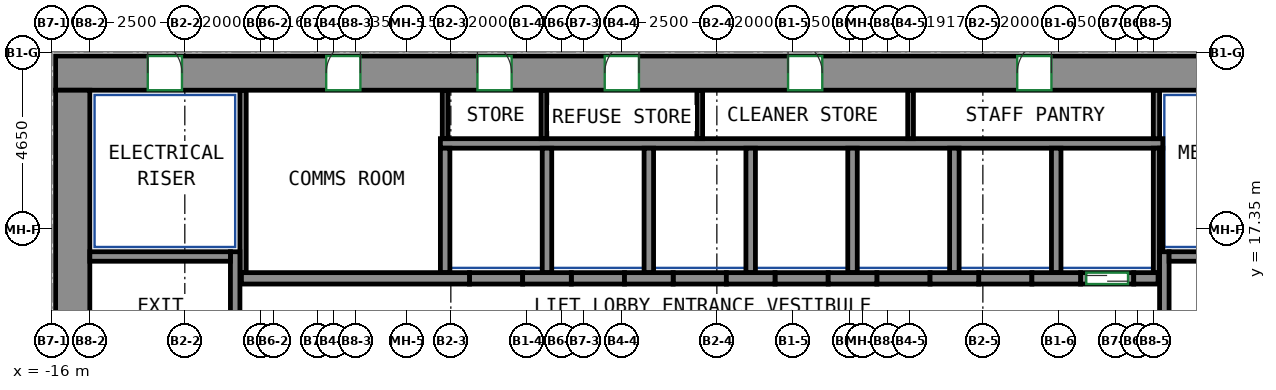
"""IFC4 building model, lengths in metres.
Left out: names, types, materials, properties, quantities, classifications, styles, units other than length and angle.
Written with IfcOpenShell. Run it as: python <this file> out.ifc"""

import sys

from ifc_helpers import new_model, si_unit, direction, frame, frame_2d, origin, place, context, subcontext, project, spatial, rectangle, extrude, source, transform, mapped, element, fill, save


model = new_model("IFC4")
c1 = context("Model", 3, precision=1e-05, world=origin(), true_north=direction((0.0, 1.0)))
c2 = subcontext(c1, "Body", "Model", "MODEL_VIEW")
j1 = project(units=[si_unit("LENGTHUNIT", "METRE"), si_unit("PLANEANGLEUNIT", "RADIAN")], contexts=[c1])
p1 = place(None, origin())
s1 = spatial("IfcSite", under=j1, at=p1, CompositionType="ELEMENT")
p2 = place(p1, origin())
s2 = spatial("IfcBuilding", under=s1, at=p2, CompositionType="ELEMENT")
p3 = place(p2, frame((0.0, 0.0, 116.6)))
s3 = spatial("IfcBuildingStorey", under=s2, at=p3, CompositionType="ELEMENT", Elevation=116.6)
m1 = source(origin(), c2, "Body", "SweptSolid", [
    extrude(rectangle(XDim=33.9, YDim=0.9, at=frame_2d((16.95, 0.0))), origin(), (0.0, 0.0, 1.0), 3.72),
])
p4 = place(p3, frame((-15.9, 21.45, 0.0), z_axis=(0.0, 0.0, 1.0), x_axis=(1.0, 0.0, 0.0)))
e1 = element("IfcWall", 1, at=p4, inside=s3, PredefinedType="SHEAR", context=c2, shape_type="MappedRepresentation", body=[
    mapped(m1, transform((0.0, 0.0, 0.0))),
])
p5 = place(p4, frame((7.12, 0.0, 0.0)))
e2 = element("IfcOpeningElement", 2, at=p5, cuts=e1, PredefinedType="OPENING", context=c2, shape_type="SweptSolid", body=[
    extrude(rectangle(XDim=0.9, YDim=2.1, at=frame_2d((0.45, 1.05))), frame((0.0, 0.46, 0.0), z_axis=(0.0, -1.0, 0.0), x_axis=(1.0, 0.0, 0.0)), (0.0, 0.0, 1.0), 0.92),
])
p6 = place(p4, frame((11.1, 0.0, 0.0)))
e3 = element("IfcOpeningElement", 3, at=p6, cuts=e1, PredefinedType="OPENING", context=c2, shape_type="SweptSolid", body=[
    extrude(rectangle(XDim=0.9, YDim=2.1, at=frame_2d((0.45, 1.05))), frame((0.0, 0.46, 0.0), z_axis=(0.0, -1.0, 0.0), x_axis=(1.0, 0.0, 0.0)), (0.0, 0.0, 1.0), 0.92),
])
p7 = place(p4, frame((14.45, 0.0, 0.0)))
e4 = element("IfcOpeningElement", 4, at=p7, cuts=e1, PredefinedType="OPENING", context=c2, shape_type="SweptSolid", body=[
    extrude(rectangle(XDim=0.9, YDim=2.1, at=frame_2d((0.45, 1.05))), frame((0.0, 0.46, 0.0), z_axis=(0.0, -1.0, 0.0), x_axis=(1.0, 0.0, 0.0)), (0.0, 0.0, 1.0), 0.92),
])
p8 = place(p4, frame((19.274, 0.0, 0.0)))
e5 = element("IfcOpeningElement", 5, at=p8, cuts=e1, PredefinedType="OPENING", context=c2, shape_type="SweptSolid", body=[
    extrude(rectangle(XDim=0.9, YDim=2.1, at=frame_2d((0.45, 1.05))), frame((0.0, 0.46, 0.0), z_axis=(0.0, -1.0, 0.0), x_axis=(1.0, 0.0, 0.0)), (0.0, 0.0, 1.0), 0.92),
])
p9 = place(p4, frame((25.304, 0.0, 0.0)))
e6 = element("IfcOpeningElement", 6, at=p9, cuts=e1, PredefinedType="OPENING", context=c2, shape_type="SweptSolid", body=[
    extrude(rectangle(XDim=0.9, YDim=2.1, at=frame_2d((0.45, 1.05))), frame((0.0, 0.46, 0.0), z_axis=(0.0, -1.0, 0.0), x_axis=(1.0, 0.0, 0.0)), (0.0, 0.0, 1.0), 0.92),
])
p10 = place(p4, frame((2.425, 0.0, 0.0)))
e7 = element("IfcOpeningElement", 7, at=p10, cuts=e1, PredefinedType="OPENING", context=c2, shape_type="SweptSolid", body=[
    extrude(rectangle(XDim=0.9, YDim=2.1, at=frame_2d((0.45, 1.05))), frame((0.0, 0.46, 0.0), z_axis=(0.0, -1.0, 0.0), x_axis=(1.0, 0.0, 0.0)), (0.0, 0.0, 1.0), 0.92),
])
p11 = place(p4, frame((30.575, 0.0, 0.0)))
e8 = element("IfcOpeningElement", 8, at=p11, cuts=e1, PredefinedType="OPENING", context=c2, shape_type="SweptSolid", body=[
    extrude(rectangle(XDim=0.9, YDim=2.1, at=frame_2d((0.45, 1.05))), frame((0.0, 0.46, 0.0), z_axis=(0.0, -1.0, 0.0), x_axis=(1.0, 0.0, 0.0)), (0.0, 0.0, 1.0), 0.92),
])
m2 = source(origin(), c2, "Body", "SweptSolid", [
    extrude(rectangle(XDim=12.0, YDim=0.9, at=frame_2d((6.0, 0.0))), origin(), (0.0, 0.0, 1.0), 3.72),
])
p12 = place(p3, frame((-15.45, 9.0, 0.0), z_axis=(0.0, 0.0, 1.0), x_axis=(0.0, 1.0, 0.0)))
e9 = element("IfcWall", 9, at=p12, inside=s3, PredefinedType="SHEAR", context=c2, shape_type="MappedRepresentation", body=[
    mapped(m2, transform((0.0, 0.0, 0.0))),
])
m3 = source(origin(), c2, "Body", "SweptSolid", [
    extrude(rectangle(XDim=7.75, YDim=0.25, at=frame_2d((3.875, 0.0))), origin(), (0.0, 0.0, 1.0), 3.72),
])
p13 = place(p3, frame((-11.175, 9.0, 0.0), z_axis=(0.0, 0.0, 1.0), x_axis=(0.0, 1.0, 0.0)))
e10 = element("IfcWall", 10, at=p13, inside=s3, PredefinedType="SHEAR", context=c2, shape_type="MappedRepresentation", body=[
    mapped(m3, transform((0.0, 0.0, 0.0))),
])
m4 = source(origin(), c2, "Body", "SweptSolid", [
    extrude(rectangle(XDim=3.7, YDim=0.25, at=frame_2d((1.85, 0.0))), origin(), (0.0, 0.0, 1.0), 3.72),
])
p14 = place(p3, frame((-15.0, 16.625, 0.0), z_axis=(0.0, 0.0, 1.0), x_axis=(1.0, 0.0, 0.0)))
e11 = element("IfcWall", 11, at=p14, inside=s3, PredefinedType="SHEAR", context=c2, shape_type="MappedRepresentation", body=[
    mapped(m4, transform((0.0, 0.0, 0.0))),
])
p15 = place(p3, frame((13.275, 9.0, 0.0), z_axis=(0.0, 0.0, 1.0), x_axis=(0.0, 1.0, 0.0)))
e12 = element("IfcWall", 12, at=p15, inside=s3, PredefinedType="SHEAR", context=c2, shape_type="MappedRepresentation", body=[
    mapped(m3, transform((0.0, 0.0, 0.0))),
])
m5 = source(origin(), c2, "Body", "SweptSolid", [
    extrude(rectangle(XDim=3.7, YDim=0.25, at=frame_2d((1.85, 0.0))), origin(), (0.0, 0.0, 1.0), 3.72),
])
p16 = place(p3, frame((13.4, 16.625, 0.0), z_axis=(0.0, 0.0, 1.0), x_axis=(1.0, 0.0, 0.0)))
e13 = element("IfcWall", 13, at=p16, inside=s3, PredefinedType="SHEAR", context=c2, shape_type="MappedRepresentation", body=[
    mapped(m5, transform((0.0, 0.0, 0.0))),
])
m6 = source(origin(), c2, "Body", "SweptSolid", [
    extrude(rectangle(XDim=6.0, YDim=0.3, at=frame_2d((3.0, 0.0))), origin(), (0.0, 0.0, 1.0), 3.72),
])
p17 = place(p3, frame((-11.01, 16.05, 0.0), z_axis=(0.0, 0.0, 1.0), x_axis=(1.0, 0.0, 0.0)))
e14 = element("IfcWall", 14, at=p17, inside=s3, PredefinedType="SHEAR", context=c2, shape_type="MappedRepresentation", body=[
    mapped(m6, transform((0.0, 0.0, 0.0))),
])
m7 = source(origin(), c2, "Body", "SweptSolid", [
    extrude(rectangle(XDim=1.28, YDim=0.3, at=frame_2d((0.64, 0.0))), origin(), (0.0, 0.0, 1.0), 3.72),
])
for number, where, z_axis, x_axis in (
    (15, (-3.61, 16.05, 0.0), (0.0, 0.0, 1.0), (1.0, 0.0, 0.0)),
    (16, (-0.93, 16.05, 0.0), (0.0, 0.0, 1.0), (1.0, 0.0, 0.0)),
    (17, (1.75, 16.05, 0.0), (0.0, 0.0, 1.0), (1.0, 0.0, 0.0)),
    (18, (4.43, 16.05, 0.0), (0.0, 0.0, 1.0), (1.0, 0.0, 0.0)),
):
    element("IfcWall", number, at=place(p3, frame(where, z_axis=z_axis, x_axis=x_axis)), inside=s3, PredefinedType="SHEAR", context=c2, shape_type="MappedRepresentation", body=[
        mapped(m7, transform((0.0, 0.0, 0.0))),
    ])
m8 = source(origin(), c2, "Body", "SweptSolid", [
    extrude(rectangle(XDim=1.28, YDim=0.3, at=frame_2d((0.64, 0.0))), origin(), (0.0, 0.0, 1.0), 3.72),
])
p18 = place(p3, frame((7.11, 16.05, 0.0), z_axis=(0.0, 0.0, 1.0), x_axis=(1.0, 0.0, 0.0)))
e19 = element("IfcWall", 19, at=p18, inside=s3, PredefinedType="SHEAR", context=c2, shape_type="MappedRepresentation", body=[
    mapped(m8, transform((0.0, 0.0, 0.0))),
])
p19 = place(p3, frame((9.79, 16.05, 0.0), z_axis=(0.0, 0.0, 1.0), x_axis=(1.0, 0.0, 0.0)))
e20 = element("IfcWall", 20, at=p19, inside=s3, PredefinedType="SHEAR", context=c2, shape_type="MappedRepresentation", body=[
    mapped(m7, transform((0.0, 0.0, 0.0))),
])
m9 = source(origin(), c2, "Body", "SweptSolid", [
    extrude(rectangle(XDim=0.64, YDim=0.3, at=frame_2d((0.32, 0.0))), origin(), (0.0, 0.0, 1.0), 3.72),
])
p20 = place(p3, frame((12.47, 16.05, 0.0), z_axis=(0.0, 0.0, 1.0), x_axis=(1.0, 0.0, 0.0)))
e21 = element("IfcWall", 21, at=p20, inside=s3, PredefinedType="SHEAR", context=c2, shape_type="MappedRepresentation", body=[
    mapped(m9, transform((0.0, 0.0, 0.0))),
])
m10 = source(origin(), c2, "Body", "SweptSolid", [
    extrude(rectangle(XDim=1.4, YDim=0.3, at=frame_2d((0.7, 0.0))), origin(), (0.0, 0.0, 1.0), 3.72),
])
p21 = place(p3, frame((11.07, 16.05, 0.0), z_axis=(0.0, 0.0, 1.0), x_axis=(1.0, 0.0, 0.0)))
e22 = element("IfcWall", 22, at=p21, inside=s3, PredefinedType="PARTITIONING", context=c2, shape_type="MappedRepresentation", body=[
    mapped(m10, transform((0.0, 0.0, 0.0))),
])
p22 = place(p21, frame((0.15, 0.0, 0.0)))
e23 = element("IfcOpeningElement", 23, at=p22, cuts=e22, PredefinedType="OPENING", context=c2, shape_type="SweptSolid", body=[
    extrude(rectangle(XDim=1.1, YDim=2.1, at=frame_2d((0.55, 1.05))), frame((0.0, 0.16, 0.0), z_axis=(0.0, -1.0, 0.0), x_axis=(1.0, 0.0, 0.0)), (0.0, 0.0, 1.0), 0.32),
])
p23 = place(p3, frame((-5.01, 16.05, 0.0), z_axis=(0.0, 0.0, 1.0), x_axis=(1.0, 0.0, 0.0)))
e24 = element("IfcWall", 24, at=p23, inside=s3, PredefinedType="PARTITIONING", context=c2, shape_type="MappedRepresentation", body=[
    mapped(m10, transform((0.0, 0.0, 0.0))),
])
m11 = source(origin(), c2, "Body", "SweptSolid", [
    extrude(rectangle(XDim=1.4, YDim=0.3, at=frame_2d((0.7, 0.0))), origin(), (0.0, 0.0, 1.0), 3.72),
])
p24 = place(p3, frame((-2.33, 16.05, 0.0), z_axis=(0.0, 0.0, 1.0), x_axis=(1.0, 0.0, 0.0)))
e25 = element("IfcWall", 25, at=p24, inside=s3, PredefinedType="PARTITIONING", context=c2, shape_type="MappedRepresentation", body=[
    mapped(m11, transform((0.0, 0.0, 0.0))),
])
for number, where, z_axis, x_axis in (
    (26, (0.35, 16.05, 0.0), (0.0, 0.0, 1.0), (1.0, 0.0, 0.0)),
    (27, (3.03, 16.05, 0.0), (0.0, 0.0, 1.0), (1.0, 0.0, 0.0)),
):
    element("IfcWall", number, at=place(p3, frame(where, z_axis=z_axis, x_axis=x_axis)), inside=s3, PredefinedType="PARTITIONING", context=c2, shape_type="MappedRepresentation", body=[
        mapped(m10, transform((0.0, 0.0, 0.0))),
    ])
for number, where, z_axis, x_axis in (
    (28, (5.71, 16.05, 0.0), (0.0, 0.0, 1.0), (1.0, 0.0, 0.0)),
    (29, (8.39, 16.05, 0.0), (0.0, 0.0, 1.0), (1.0, 0.0, 0.0)),
):
    element("IfcWall", number, at=place(p3, frame(where, z_axis=z_axis, x_axis=x_axis)), inside=s3, PredefinedType="PARTITIONING", context=c2, shape_type="MappedRepresentation", body=[
        mapped(m11, transform((0.0, 0.0, 0.0))),
    ])
m12 = source(origin(), c2, "Body", "SweptSolid", [
    extrude(rectangle(XDim=19.01, YDim=0.25, at=frame_2d((9.505, 0.0))), origin(), (0.0, 0.0, 1.0), 3.72),
])
p25 = place(p3, frame((-5.775, 19.6, 0.0), z_axis=(0.0, 0.0, 1.0), x_axis=(1.0, 0.0, 0.0)))
e30 = element("IfcWall", 30, at=p25, inside=s3, PredefinedType="PARTITIONING", context=c2, shape_type="MappedRepresentation", body=[
    mapped(m12, transform((0.0, 0.0, 0.0))),
])
m13 = source(origin(), c2, "Body", "SweptSolid", [
    extrude(rectangle(XDim=3.275, YDim=0.165, at=frame_2d((1.638, 0.0))), origin(), (0.0, 0.0, 1.0), 3.72),
])
p26 = place(p3, frame((13.067, 16.2, 0.0), z_axis=(0.0, 0.0, 1.0), x_axis=(0.0, 1.0, 0.0)))
e31 = element("IfcWall", 31, at=p26, inside=s3, PredefinedType="PARTITIONING", context=c2, shape_type="MappedRepresentation", body=[
    mapped(m13, transform((0.0, 0.0, 0.0))),
])
m14 = source(origin(), c2, "Body", "SweptSolid", [
    extrude(rectangle(XDim=1.275, YDim=0.165, at=frame_2d((0.637, 0.0))), origin(), (0.0, 0.0, 1.0), 3.72),
])
p27 = place(p3, frame((13.067, 19.725, 0.0), z_axis=(0.0, 0.0, 1.0), x_axis=(0.0, 1.0, 0.0)))
e32 = element("IfcWall", 32, at=p27, inside=s3, PredefinedType="PARTITIONING", context=c2, shape_type="MappedRepresentation", body=[
    mapped(m14, transform((0.0, 0.0, 0.0))),
])
m15 = source(origin(), c2, "Body", "SweptSolid", [
    extrude(rectangle(XDim=4.8, YDim=0.165, at=frame_2d((2.4, 0.0))), origin(), (0.0, 0.0, 1.0), 3.72),
])
p28 = place(p3, frame((-10.968, 16.2, 0.0), z_axis=(0.0, 0.0, 1.0), x_axis=(0.0, 1.0, 0.0)))
e33 = element("IfcWall", 33, at=p28, inside=s3, PredefinedType="PARTITIONING", context=c2, shape_type="MappedRepresentation", body=[
    mapped(m15, transform((0.0, 0.0, 0.0))),
])
m16 = source(origin(), c2, "Body", "SweptSolid", [
    extrude(rectangle(XDim=3.275, YDim=0.25, at=frame_2d((1.638, 0.0))), origin(), (0.0, 0.0, 1.0), 3.72),
])
p29 = place(p3, frame((10.43, 16.2, 0.0), z_axis=(0.0, 0.0, 1.0), x_axis=(0.0, 1.0, 0.0)))
e34 = element("IfcWall", 34, at=p29, inside=s3, PredefinedType="PARTITIONING", context=c2, shape_type="MappedRepresentation", body=[
    mapped(m16, transform((0.0, 0.0, 0.0))),
])
m17 = source(origin(), c2, "Body", "SweptSolid", [
    extrude(rectangle(XDim=2.725, YDim=0.085, at=frame_2d((1.363, 0.0))), origin(), (0.0, 0.0, 1.0), 3.72),
])
p30 = place(p3, frame((13.192, 16.75, 0.0), z_axis=(0.0, 0.0, 1.0), x_axis=(0.0, 1.0, 0.0)))
e35 = element("IfcWall", 35, at=p30, inside=s3, PredefinedType="PARTITIONING", context=c2, shape_type="MappedRepresentation", body=[
    mapped(m17, transform((0.0, 0.0, 0.0))),
])
for number, where, z_axis, x_axis in (
    (36, (2.39, 16.2, 0.0), (0.0, 0.0, 1.0), (0.0, 1.0, 0.0)),
    (37, (5.07, 16.2, 0.0), (0.0, 0.0, 1.0), (0.0, 1.0, 0.0)),
    (38, (7.75, 16.2, 0.0), (0.0, 0.0, 1.0), (0.0, 1.0, 0.0)),
    (39, (-0.29, 16.2, 0.0), (0.0, 0.0, 1.0), (0.0, 1.0, 0.0)),
    (40, (-2.97, 16.2, 0.0), (0.0, 0.0, 1.0), (0.0, 1.0, 0.0)),
    (41, (-5.65, 16.2, 0.0), (0.0, 0.0, 1.0), (0.0, 1.0, 0.0)),
):
    element("IfcWall", number, at=place(p3, frame(where, z_axis=z_axis, x_axis=x_axis)), inside=s3, PredefinedType="PARTITIONING", context=c2, shape_type="MappedRepresentation", body=[
        mapped(m16, transform((0.0, 0.0, 0.0))),
    ])
m18 = source(origin(), c2, "Body", "SweptSolid", [
    extrude(rectangle(XDim=1.275, YDim=0.15, at=frame_2d((0.637, 0.0))), origin(), (0.0, 0.0, 1.0), 3.72),
])
for number, where, z_axis, x_axis in (
    (42, (-5.65, 19.725, 0.0), (0.0, 0.0, 1.0), (0.0, 1.0, 0.0)),
    (43, (-3.05, 19.725, 0.0), (0.0, 0.0, 1.0), (0.0, 1.0, 0.0)),
    (44, (1.05, 19.725, 0.0), (0.0, 0.0, 1.0), (0.0, 1.0, 0.0)),
    (45, (6.598, 19.725, 0.0), (0.0, 0.0, 1.0), (0.0, 1.0, 0.0)),
):
    element("IfcWall", number, at=place(p3, frame(where, z_axis=z_axis, x_axis=x_axis)), inside=s3, PredefinedType="PARTITIONING", context=c2, shape_type="MappedRepresentation", body=[
        mapped(m18, transform((0.0, 0.0, 0.0))),
    ])
p31 = place(p22, origin())
e46 = element("IfcDoor", 46, at=p31, inside=s3, OperationType="DOUBLE_DOOR_SLIDING", PredefinedType="DOOR", context=c2, shape_type="SweptSolid", body=[
    extrude(rectangle(XDim=1.1, YDim=2.1, at=frame_2d((0.55, 1.05))), frame((0.0, 0.025, 0.0), z_axis=(0.0, -1.0, 0.0), x_axis=(1.0, 0.0, 0.0)), (0.0, 0.0, 1.0), 0.05),
])
fill(e23, e46)
p32 = place(p5, origin())
e47 = element("IfcDoor", 47, at=p32, inside=s3, OperationType="SINGLE_SWING_RIGHT", PredefinedType="DOOR", context=c2, shape_type="SweptSolid", body=[
    extrude(rectangle(XDim=0.9, YDim=2.1, at=frame_2d((0.45, 1.05))), frame((0.0, -0.305, 0.0), z_axis=(0.0, -1.0, 0.0), x_axis=(1.0, 0.0, 0.0)), (0.0, 0.0, 1.0), 0.05),
])
fill(e2, e47)
p33 = place(p6, origin())
e48 = element("IfcDoor", 48, at=p33, inside=s3, OperationType="SINGLE_SWING_LEFT", PredefinedType="DOOR", context=c2, shape_type="SweptSolid", body=[
    extrude(rectangle(XDim=0.9, YDim=2.1, at=frame_2d((0.45, 1.05))), frame((0.0, -0.305, 0.0), z_axis=(0.0, -1.0, 0.0), x_axis=(1.0, 0.0, 0.0)), (0.0, 0.0, 1.0), 0.05),
])
fill(e3, e48)
p34 = place(p7, origin())
e49 = element("IfcDoor", 49, at=p34, inside=s3, OperationType="SINGLE_SWING_RIGHT", PredefinedType="DOOR", context=c2, shape_type="SweptSolid", body=[
    extrude(rectangle(XDim=0.9, YDim=2.1, at=frame_2d((0.45, 1.05))), frame((0.0, -0.305, 0.0), z_axis=(0.0, -1.0, 0.0), x_axis=(1.0, 0.0, 0.0)), (0.0, 0.0, 1.0), 0.05),
])
fill(e4, e49)
p35 = place(p8, origin())
e50 = element("IfcDoor", 50, at=p35, inside=s3, OperationType="SINGLE_SWING_LEFT", PredefinedType="DOOR", context=c2, shape_type="SweptSolid", body=[
    extrude(rectangle(XDim=0.9, YDim=2.1, at=frame_2d((0.45, 1.05))), frame((0.0, -0.305, 0.0), z_axis=(0.0, -1.0, 0.0), x_axis=(1.0, 0.0, 0.0)), (0.0, 0.0, 1.0), 0.05),
])
fill(e5, e50)
p36 = place(p9, origin())
e51 = element("IfcDoor", 51, at=p36, inside=s3, OperationType="SINGLE_SWING_RIGHT", PredefinedType="DOOR", context=c2, shape_type="SweptSolid", body=[
    extrude(rectangle(XDim=0.9, YDim=2.1, at=frame_2d((0.45, 1.05))), frame((0.0, -0.305, 0.0), z_axis=(0.0, -1.0, 0.0), x_axis=(1.0, 0.0, 0.0)), (0.0, 0.0, 1.0), 0.05),
])
fill(e6, e51)
p37 = place(p10, origin())
e52 = element("IfcDoor", 52, at=p37, inside=s3, OperationType="SINGLE_SWING_LEFT", PredefinedType="DOOR", context=c2, shape_type="SweptSolid", body=[
    extrude(rectangle(XDim=0.9, YDim=2.1, at=frame_2d((0.45, 1.05))), frame((0.0, -0.305, 0.0), z_axis=(0.0, -1.0, 0.0), x_axis=(1.0, 0.0, 0.0)), (0.0, 0.0, 1.0), 0.05),
])
fill(e7, e52)
save(model, sys.argv[1])
